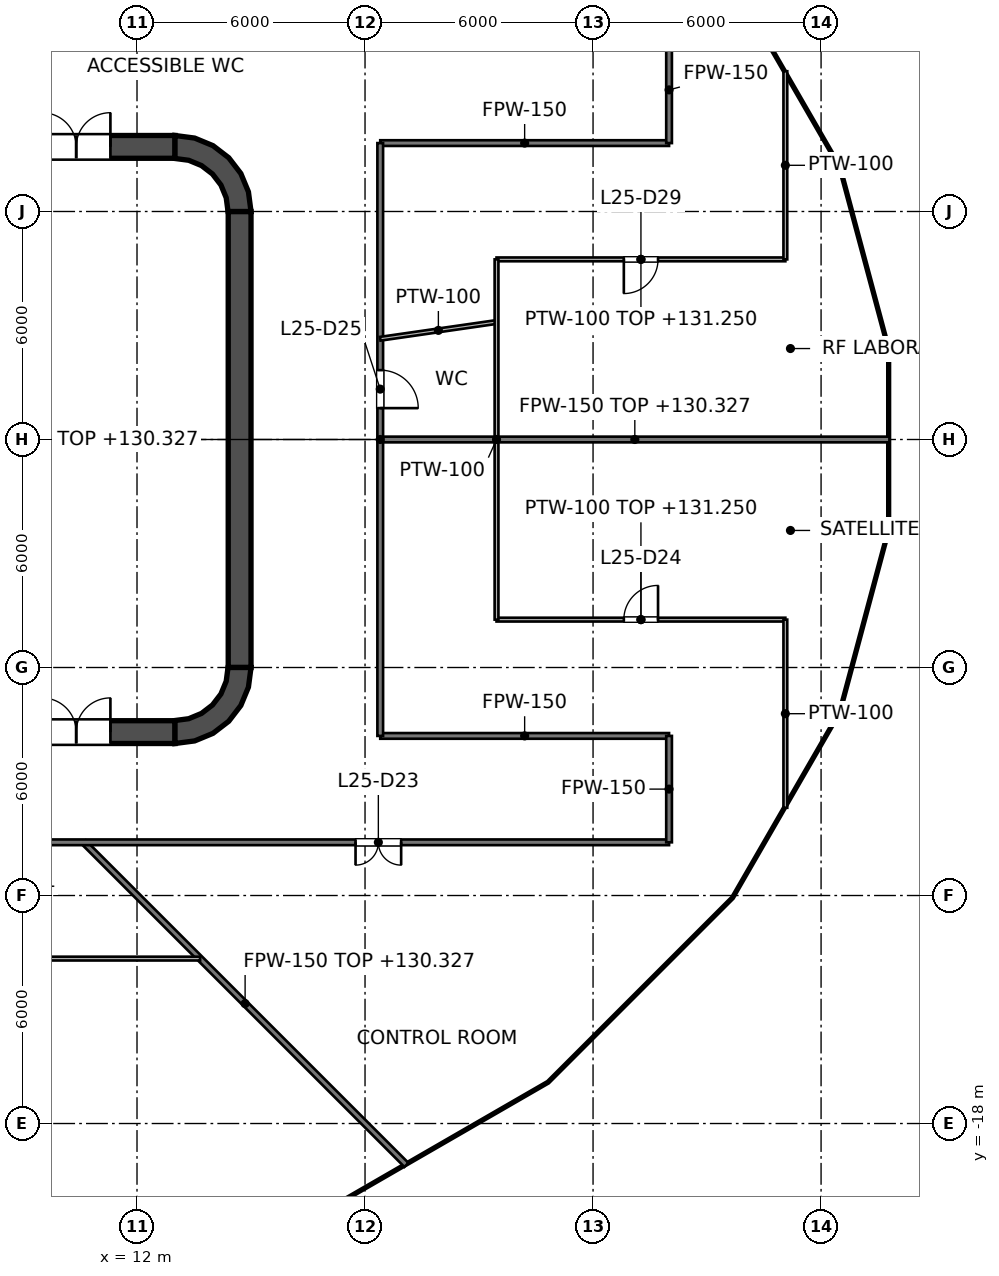
"""IFC4 building model, lengths in metres.
Left out: names, types, materials, properties, quantities, classifications, styles, units other than length and angle.
Written with IfcOpenShell. Run it as: python <this file> out.ifc"""

import sys

from ifc_helpers import new_model, si_unit, direction, frame, frame_2d, origin, place, context, subcontext, project, spatial, polyline, rectangle, outline, extrude, element, fill, save


model = new_model("IFC4")
c1 = context("Model", 3, precision=1e-05, world=origin(), true_north=direction((0.0, 1.0)))
c2 = subcontext(c1, "Body", "Model", "MODEL_VIEW")
j1 = project(units=[si_unit("LENGTHUNIT", "METRE"), si_unit("PLANEANGLEUNIT", "RADIAN")], contexts=[c1])
p1 = place(None, origin())
s1 = spatial("IfcSite", under=j1, at=p1, CompositionType="ELEMENT")
p2 = place(p1, origin())
s2 = spatial("IfcBuilding", under=s1, at=p2, CompositionType="ELEMENT")
p3 = place(p2, frame((0.0, 0.0, 127.2)))
s3 = spatial("IfcBuildingStorey", under=s2, at=p3, CompositionType="ELEMENT", Elevation=127.2)
p4 = place(p3, frame((-13.0, 7.7, 0.0), z_axis=(0.0, 0.0, 1.0), x_axis=(1.0, 0.0, 0.0)))
e1 = element("IfcWall", 1, at=p4, inside=s3, PredefinedType="SHEAR", context=c2, shape_type="SweptSolid", body=[
    extrude(rectangle(XDim=26.0, YDim=0.6, at=frame_2d((13.0, 0.0))), origin(), (0.0, 0.0, 1.0), 4.2),
])
p5 = place(p4, frame((1.7, 0.0, 0.0)))
e2 = element("IfcOpeningElement", 2, at=p5, cuts=e1, PredefinedType="OPENING", context=c2, shape_type="SweptSolid", body=[
    extrude(rectangle(XDim=1.8, YDim=2.1, at=frame_2d((0.9, 1.05))), frame((0.0, 0.3, 0.0), z_axis=(0.0, -1.0, 0.0), x_axis=(1.0, 0.0, 0.0)), (0.0, 0.0, 1.0), 0.6),
])
p6 = place(p4, frame((22.5, 0.0, 0.0)))
e3 = element("IfcOpeningElement", 3, at=p6, cuts=e1, PredefinedType="OPENING", context=c2, shape_type="SweptSolid", body=[
    extrude(rectangle(XDim=1.8, YDim=2.1, at=frame_2d((0.9, 1.05))), frame((0.0, 0.3, 0.0), z_axis=(0.0, -1.0, 0.0), x_axis=(1.0, 0.0, 0.0)), (0.0, 0.0, 1.0), 0.6),
])
p7 = place(p3, frame((-13.0, -7.7, 0.0), z_axis=(0.0, 0.0, 1.0), x_axis=(1.0, 0.0, 0.0)))
e4 = element("IfcWall", 4, at=p7, inside=s3, PredefinedType="SHEAR", context=c2, shape_type="SweptSolid", body=[
    extrude(rectangle(XDim=26.0, YDim=0.6, at=frame_2d((13.0, 0.0))), origin(), (0.0, 0.0, 1.0), 4.2),
])
p8 = place(p7, frame((1.7, 0.0, 0.0)))
e5 = element("IfcOpeningElement", 5, at=p8, cuts=e4, PredefinedType="OPENING", context=c2, shape_type="SweptSolid", body=[
    extrude(rectangle(XDim=1.8, YDim=2.1, at=frame_2d((0.9, 1.05))), frame((0.0, 0.3, 0.0), z_axis=(0.0, -1.0, 0.0), x_axis=(1.0, 0.0, 0.0)), (0.0, 0.0, 1.0), 0.6),
])
p9 = place(p7, frame((22.5, 0.0, 0.0)))
e6 = element("IfcOpeningElement", 6, at=p9, cuts=e4, PredefinedType="OPENING", context=c2, shape_type="SweptSolid", body=[
    extrude(rectangle(XDim=1.8, YDim=2.1, at=frame_2d((0.9, 1.05))), frame((0.0, 0.3, 0.0), z_axis=(0.0, -1.0, 0.0), x_axis=(1.0, 0.0, 0.0)), (0.0, 0.0, 1.0), 0.6),
])
p10 = place(p3, frame((14.7, -6.0, 0.0), z_axis=(0.0, 0.0, 1.0), x_axis=(0.0, 1.0, 0.0)))
e7 = element("IfcWall", 7, at=p10, inside=s3, PredefinedType="SHEAR", context=c2, shape_type="SweptSolid", body=[
    extrude(rectangle(XDim=12.0, YDim=0.6, at=frame_2d((6.0, 0.0))), origin(), (0.0, 0.0, 1.0), 4.2),
])
p11 = place(p3, origin())
e8 = element("IfcWall", 8, at=p11, inside=s3, PredefinedType="SHEAR", context=c2, shape_type="SweptSolid", body=[
    extrude(outline(polyline([(13.0, 8.0), (13.0, 7.395), (13.361, 7.347), (13.698, 7.208), (13.986, 6.986), (14.208, 6.698), (14.347, 6.361), (14.395, 6.0), (15.0, 6.0), (14.932, 6.518), (14.732, 7.0), (14.414, 7.414), (14.0, 7.732), (13.518, 7.932), (13.0, 8.0)])), origin(), (0.0, 0.0, 1.0), 4.2),
])
e9 = element("IfcWall", 9, at=p11, inside=s3, PredefinedType="SHEAR", context=c2, shape_type="SweptSolid", body=[
    extrude(outline(polyline([(15.0, -6.0), (14.395, -6.0), (14.347, -6.361), (14.208, -6.698), (13.986, -6.986), (13.698, -7.208), (13.361, -7.347), (13.0, -7.395), (13.0, -8.0), (13.518, -7.932), (14.0, -7.732), (14.414, -7.414), (14.732, -7.0), (14.932, -6.518), (15.0, -6.0)])), origin(), (0.0, 0.0, 1.0), 4.2),
])
p12 = place(p3, frame((11.8, -7.4, 0.0), z_axis=(0.0, 0.0, 1.0), x_axis=(0.0, 1.0, 0.0)))
e10 = element("IfcWall", 10, at=p12, inside=s3, PredefinedType="SOLIDWALL", context=c2, shape_type="SweptSolid", body=[
    extrude(rectangle(XDim=14.8, YDim=0.4, at=frame_2d((7.4, 0.0))), origin(), (0.0, 0.0, 1.0), 4.05),
])
p13 = place(p12, frame((11.2, 0.0, 0.0)))
e11 = element("IfcOpeningElement", 11, at=p13, cuts=e10, PredefinedType="OPENING", context=c2, shape_type="SweptSolid", body=[
    extrude(rectangle(XDim=1.1, YDim=2.1, at=frame_2d((0.55, 1.05))), frame((0.0, 0.2, 0.0), z_axis=(0.0, -1.0, 0.0), x_axis=(1.0, 0.0, 0.0)), (0.0, 0.0, 1.0), 0.4),
])
p14 = place(p12, frame((8.3, 0.0, 0.0)))
e12 = element("IfcOpeningElement", 12, at=p14, cuts=e10, PredefinedType="OPENING", context=c2, shape_type="SweptSolid", body=[
    extrude(rectangle(XDim=1.1, YDim=2.1, at=frame_2d((0.55, 1.05))), frame((0.0, 0.2, 0.0), z_axis=(0.0, -1.0, 0.0), x_axis=(1.0, 0.0, 0.0)), (0.0, 0.0, 1.0), 0.4),
])
p15 = place(p12, frame((5.4, 0.0, 0.0)))
e13 = element("IfcOpeningElement", 13, at=p15, cuts=e10, PredefinedType="OPENING", context=c2, shape_type="SweptSolid", body=[
    extrude(rectangle(XDim=1.1, YDim=2.1, at=frame_2d((0.55, 1.05))), frame((0.0, 0.2, 0.0), z_axis=(0.0, -1.0, 0.0), x_axis=(1.0, 0.0, 0.0)), (0.0, 0.0, 1.0), 0.4),
])
p16 = place(p12, frame((13.552, 0.0, 0.0)))
e14 = element("IfcOpeningElement", 14, at=p16, cuts=e10, PredefinedType="OPENING", context=c2, shape_type="SweptSolid", body=[
    extrude(rectangle(XDim=0.9, YDim=2.1, at=frame_2d((0.45, 1.05))), frame((0.0, 0.2, 0.0), z_axis=(0.0, -1.0, 0.0), x_axis=(1.0, 0.0, 0.0)), (0.0, 0.0, 1.0), 0.4),
])
p17 = place(p12, frame((0.347, 0.0, 0.0)))
e15 = element("IfcOpeningElement", 15, at=p17, cuts=e10, PredefinedType="OPENING", context=c2, shape_type="SweptSolid", body=[
    extrude(rectangle(XDim=0.9, YDim=2.1, at=frame_2d((0.45, 1.05))), frame((0.0, 0.2, 0.0), z_axis=(0.0, -1.0, 0.0), x_axis=(1.0, 0.0, 0.0)), (0.0, 0.0, 1.0), 0.4),
])
e16 = element("IfcWall", 16, at=p11, inside=s3, PredefinedType="SOLIDWALL", context=c2, shape_type="SweptSolid", body=[
    extrude(outline(polyline([(12.0, -5.675), (12.0, -5.925), (14.15, -5.925), (14.4, -5.925), (14.4, -5.675), (14.4, -3.025), (14.4, -2.775), (14.4, -0.125), (14.4, 0.125), (14.4, 2.775), (14.4, 3.025), (14.4, 5.675), (14.4, 5.925), (14.15, 5.925), (12.0, 5.925), (12.0, 5.675), (14.15, 5.675), (14.15, 3.025), (12.0, 3.025), (12.0, 2.775), (14.15, 2.775), (14.15, 0.125), (12.0, 0.125), (12.0, -0.125), (14.15, -0.125), (14.15, -2.775), (12.0, -2.775), (12.0, -3.025), (14.15, -3.025), (14.15, -5.675), (12.0, -5.675)])), origin(), (0.0, 0.0, 1.0), 4.05),
])
p18 = place(p3, frame((10.6, -10.6, 0.0), z_axis=(0.0, 0.0, 1.0), x_axis=(0.707106781187, -0.707106781187, 0.0)))
e17 = element("IfcWall", 17, at=p18, inside=s3, PredefinedType="PARTITIONING", context=c2, shape_type="SweptSolid", body=[
    extrude(rectangle(XDim=12.005, YDim=0.15, at=frame_2d((6.003, 0.0))), origin(), (0.0, 0.0, 1.0), 3.127),
])
p19 = place(p3, frame((-26.0, -10.6, 0.0), z_axis=(0.0, 0.0, 1.0), x_axis=(1.0, 0.0, 0.0)))
e18 = element("IfcWall", 18, at=p19, inside=s3, PredefinedType="PARTITIONING", context=c2, shape_type="SweptSolid", body=[
    extrude(rectangle(XDim=52.0, YDim=0.15, at=frame_2d((26.0, 0.0))), origin(), (0.0, 0.0, 1.0), 3.127),
])
p20 = place(p19, frame((22.49, 0.0, 0.0)))
e19 = element("IfcOpeningElement", 19, at=p20, cuts=e18, PredefinedType="OPENING", context=c2, shape_type="SweptSolid", body=[
    extrude(rectangle(XDim=1.0, YDim=2.1, at=frame_2d((0.5, 1.05))), frame((0.0, 0.075, 0.0), z_axis=(0.0, -1.0, 0.0), x_axis=(1.0, 0.0, 0.0)), (0.0, 0.0, 1.0), 0.15),
])
p21 = place(p19, frame((30.8, 0.0, 0.0)))
e20 = element("IfcOpeningElement", 20, at=p21, cuts=e18, PredefinedType="OPENING", context=c2, shape_type="SweptSolid", body=[
    extrude(rectangle(XDim=1.0, YDim=2.1, at=frame_2d((0.5, 1.05))), frame((0.0, 0.075, 0.0), z_axis=(0.0, -1.0, 0.0), x_axis=(1.0, 0.0, 0.0)), (0.0, 0.0, 1.0), 0.15),
])
p22 = place(p19, frame((43.75, 0.0, 0.0)))
e21 = element("IfcOpeningElement", 21, at=p22, cuts=e18, PredefinedType="OPENING", context=c2, shape_type="SweptSolid", body=[
    extrude(rectangle(XDim=1.2, YDim=2.1, at=frame_2d((0.6, 1.05))), frame((0.0, 0.075, 0.0), z_axis=(0.0, -1.0, 0.0), x_axis=(1.0, 0.0, 0.0)), (0.0, 0.0, 1.0), 0.15),
])
p23 = place(p19, frame((9.44, 0.0, 0.0)))
e22 = element("IfcOpeningElement", 22, at=p23, cuts=e18, PredefinedType="OPENING", context=c2, shape_type="SweptSolid", body=[
    extrude(rectangle(XDim=1.0, YDim=2.1, at=frame_2d((0.5, 1.05))), frame((0.0, 0.075, 0.0), z_axis=(0.0, -1.0, 0.0), x_axis=(1.0, 0.0, 0.0)), (0.0, 0.0, 1.0), 0.15),
])
p24 = place(p3, frame((18.4, -7.8, 0.0), z_axis=(0.0, 0.0, 1.0), x_axis=(1.0, 0.0, 0.0)))
e23 = element("IfcWall", 23, at=p24, inside=s3, PredefinedType="PARTITIONING", context=c2, shape_type="SweptSolid", body=[
    extrude(rectangle(XDim=7.6, YDim=0.15, at=frame_2d((3.8, 0.0))), origin(), (0.0, 0.0, 1.0), 3.195),
])
p25 = place(p3, frame((18.4, 0.0, 0.0), z_axis=(0.0, 0.0, 1.0), x_axis=(1.0, 0.0, 0.0)))
e24 = element("IfcWall", 24, at=p25, inside=s3, PredefinedType="PARTITIONING", context=c2, shape_type="SweptSolid", body=[
    extrude(rectangle(XDim=13.398, YDim=0.15, at=frame_2d((6.699, 0.0))), origin(), (0.0, 0.0, 1.0), 3.127),
])
p26 = place(p3, frame((18.4, 7.8, 0.0), z_axis=(0.0, 0.0, 1.0), x_axis=(1.0, 0.0, 0.0)))
e25 = element("IfcWall", 25, at=p26, inside=s3, PredefinedType="PARTITIONING", context=c2, shape_type="SweptSolid", body=[
    extrude(rectangle(XDim=7.6, YDim=0.15, at=frame_2d((3.8, 0.0))), origin(), (0.0, 0.0, 1.0), 3.195),
])
for number, where, z_axis, x_axis in (
    (26, (26.0, -10.6, 0.0), (0.0, 0.0, 1.0), (0.0, 1.0, 0.0)),
    (27, (26.0, 7.8, 0.0), (0.0, 0.0, 1.0), (0.0, 1.0, 0.0)),
):
    element("IfcWall", number, at=place(p3, frame(where, z_axis=z_axis, x_axis=x_axis)), inside=s3, PredefinedType="PARTITIONING", context=c2, shape_type="SweptSolid", body=[
        extrude(rectangle(XDim=2.8, YDim=0.15, at=frame_2d((1.4, 0.0))), origin(), (0.0, 0.0, 1.0), 3.195),
    ])
p27 = place(p3, frame((18.4, -7.8, 0.0), z_axis=(0.0, 0.0, 1.0), x_axis=(0.0, 1.0, 0.0)))
e28 = element("IfcWall", 28, at=p27, inside=s3, PredefinedType="PARTITIONING", context=c2, shape_type="SweptSolid", body=[
    extrude(rectangle(XDim=15.6, YDim=0.15, at=frame_2d((7.8, 0.0))), origin(), (0.0, 0.0, 1.0), 3.127),
])
p28 = place(p27, frame((8.625, 0.0, 0.0)))
e29 = element("IfcOpeningElement", 29, at=p28, cuts=e28, PredefinedType="OPENING", context=c2, shape_type="SweptSolid", body=[
    extrude(rectangle(XDim=1.0, YDim=2.1, at=frame_2d((0.5, 1.05))), frame((0.0, 0.075, 0.0), z_axis=(0.0, -1.0, 0.0), x_axis=(1.0, 0.0, 0.0)), (0.0, 0.0, 1.0), 0.15),
])
p29 = place(p3, frame((-26.097, -13.66, 0.0), z_axis=(0.0, 0.0, 1.0), x_axis=(1.0, 0.0, 0.0)))
e30 = element("IfcWall", 30, at=p29, inside=s3, PredefinedType="PARTITIONING", context=c2, shape_type="SweptSolid", body=[
    extrude(rectangle(XDim=39.757, YDim=0.1, at=frame_2d((19.878, 0.0))), origin(), (0.0, 0.0, 1.0), 3.127),
])
p30 = place(p29, frame((32.027, 0.0, 0.0)))
e31 = element("IfcOpeningElement", 31, at=p30, cuts=e30, PredefinedType="OPENING", context=c2, shape_type="SweptSolid", body=[
    extrude(rectangle(XDim=1.8, YDim=2.1, at=frame_2d((0.9, 1.05))), frame((0.0, 0.05, 0.0), z_axis=(0.0, -1.0, 0.0), x_axis=(1.0, 0.0, 0.0)), (0.0, 0.0, 1.0), 0.1),
])
p31 = place(p29, frame((8.605, 0.0, 0.0)))
e32 = element("IfcOpeningElement", 32, at=p31, cuts=e30, PredefinedType="OPENING", context=c2, shape_type="SweptSolid", body=[
    extrude(rectangle(XDim=0.9, YDim=2.1, at=frame_2d((0.45, 1.05))), frame((0.0, 0.05, 0.0), z_axis=(0.0, -1.0, 0.0), x_axis=(1.0, 0.0, 0.0)), (0.0, 0.0, 1.0), 0.1),
])
p32 = place(p3, frame((21.46, -4.74, 0.0), z_axis=(0.0, 0.0, 1.0), x_axis=(1.0, 0.0, 0.0)))
e33 = element("IfcWall", 33, at=p32, inside=s3, PredefinedType="PARTITIONING", context=c2, shape_type="SweptSolid", body=[
    extrude(rectangle(XDim=7.6, YDim=0.1, at=frame_2d((3.8, 0.0))), origin(), (0.0, 0.0, 1.0), 4.05),
])
p33 = place(p32, frame((3.35, 0.0, 0.0)))
e34 = element("IfcOpeningElement", 34, at=p33, cuts=e33, PredefinedType="OPENING", context=c2, shape_type="SweptSolid", body=[
    extrude(rectangle(XDim=0.9, YDim=2.1, at=frame_2d((0.45, 1.05))), frame((0.0, 0.05, 0.0), z_axis=(0.0, -1.0, 0.0), x_axis=(1.0, 0.0, 0.0)), (0.0, 0.0, 1.0), 0.1),
])
p34 = place(p3, frame((21.46, 4.74, 0.0), z_axis=(0.0, 0.0, 1.0), x_axis=(1.0, 0.0, 0.0)))
e35 = element("IfcWall", 35, at=p34, inside=s3, PredefinedType="PARTITIONING", context=c2, shape_type="SweptSolid", body=[
    extrude(rectangle(XDim=7.6, YDim=0.1, at=frame_2d((3.8, 0.0))), origin(), (0.0, 0.0, 1.0), 4.05),
])
p35 = place(p34, frame((3.35, 0.0, 0.0)))
e36 = element("IfcOpeningElement", 36, at=p35, cuts=e35, PredefinedType="OPENING", context=c2, shape_type="SweptSolid", body=[
    extrude(rectangle(XDim=0.9, YDim=2.1, at=frame_2d((0.45, 1.05))), frame((0.0, 0.05, 0.0), z_axis=(0.0, -1.0, 0.0), x_axis=(1.0, 0.0, 0.0)), (0.0, 0.0, 1.0), 0.1),
])
p36 = place(p3, frame((18.4, 2.651, 0.0), z_axis=(0.0, 0.0, 1.0), x_axis=(0.989767054152, 0.142692601472, 0.0)))
e37 = element("IfcWall", 37, at=p36, inside=s3, PredefinedType="PARTITIONING", context=c2, shape_type="SweptSolid", body=[
    extrude(rectangle(XDim=3.092, YDim=0.1, at=frame_2d((1.546, 0.0))), origin(), (0.0, 0.0, 1.0), 3.127),
])
for number, where, z_axis, x_axis in (
    (38, (29.06, -9.691, 0.0), (0.0, 0.0, 1.0), (0.0, 1.0, 0.0)),
    (39, (29.06, 4.74, 0.0), (0.0, 0.0, 1.0), (0.0, 1.0, 0.0)),
):
    element("IfcWall", number, at=place(p3, frame(where, z_axis=z_axis, x_axis=x_axis)), inside=s3, PredefinedType="PARTITIONING", context=c2, shape_type="SweptSolid", body=[
        extrude(rectangle(XDim=4.951, YDim=0.1, at=frame_2d((2.476, 0.0))), origin(), (0.0, 0.0, 1.0), 3.127),
    ])
p37 = place(p3, frame((21.46, -4.74, 0.0), z_axis=(0.0, 0.0, 1.0), x_axis=(0.0, 1.0, 0.0)))
e40 = element("IfcWall", 40, at=p37, inside=s3, PredefinedType="PARTITIONING", context=c2, shape_type="SweptSolid", body=[
    extrude(rectangle(XDim=9.48, YDim=0.1, at=frame_2d((4.74, 0.0))), origin(), (0.0, 0.0, 1.0), 3.127),
])
p38 = place(p13, origin())
e41 = element("IfcDoor", 41, at=p38, inside=s3, OperationType="DOUBLE_DOOR_SLIDING", PredefinedType="DOOR", context=c2, shape_type="SweptSolid", body=[
    extrude(rectangle(XDim=1.1, YDim=2.1, at=frame_2d((0.55, 1.05))), frame((0.0, 0.025, 0.0), z_axis=(0.0, -1.0, 0.0), x_axis=(1.0, 0.0, 0.0)), (0.0, 0.0, 1.0), 0.05),
])
fill(e11, e41)
p39 = place(p14, origin())
e42 = element("IfcDoor", 42, at=p39, inside=s3, OperationType="DOUBLE_DOOR_SLIDING", PredefinedType="DOOR", context=c2, shape_type="SweptSolid", body=[
    extrude(rectangle(XDim=1.1, YDim=2.1, at=frame_2d((0.55, 1.05))), frame((0.0, 0.025, 0.0), z_axis=(0.0, -1.0, 0.0), x_axis=(1.0, 0.0, 0.0)), (0.0, 0.0, 1.0), 0.05),
])
fill(e12, e42)
p40 = place(p15, origin())
e43 = element("IfcDoor", 43, at=p40, inside=s3, OperationType="DOUBLE_DOOR_SLIDING", PredefinedType="DOOR", context=c2, shape_type="SweptSolid", body=[
    extrude(rectangle(XDim=1.1, YDim=2.1, at=frame_2d((0.55, 1.05))), frame((0.0, 0.025, 0.0), z_axis=(0.0, -1.0, 0.0), x_axis=(1.0, 0.0, 0.0)), (0.0, 0.0, 1.0), 0.05),
])
fill(e13, e43)
p41 = place(p16, origin())
e44 = element("IfcDoor", 44, at=p41, inside=s3, OperationType="SINGLE_SWING_RIGHT", PredefinedType="DOOR", context=c2, shape_type="SweptSolid", body=[
    extrude(rectangle(XDim=0.9, YDim=2.1, at=frame_2d((0.45, 1.05))), frame((0.0, 0.025, 0.0), z_axis=(0.0, -1.0, 0.0), x_axis=(1.0, 0.0, 0.0)), (0.0, 0.0, 1.0), 0.05),
])
fill(e14, e44)
p42 = place(p17, origin())
e45 = element("IfcDoor", 45, at=p42, inside=s3, OperationType="SINGLE_SWING_RIGHT", PredefinedType="DOOR", context=c2, shape_type="SweptSolid", body=[
    extrude(rectangle(XDim=0.9, YDim=2.1, at=frame_2d((0.45, 1.05))), frame((0.0, 0.025, 0.0), z_axis=(0.0, -1.0, 0.0), x_axis=(1.0, 0.0, 0.0)), (0.0, 0.0, 1.0), 0.05),
])
fill(e15, e45)
p43 = place(p6, origin())
e46 = element("IfcDoor", 46, at=p43, inside=s3, OperationType="DOUBLE_DOOR_SINGLE_SWING", PredefinedType="DOOR", context=c2, shape_type="SweptSolid", body=[
    extrude(rectangle(XDim=1.8, YDim=2.1, at=frame_2d((0.9, 1.05))), frame((0.0, 0.025, 0.0), z_axis=(0.0, -1.0, 0.0), x_axis=(1.0, 0.0, 0.0)), (0.0, 0.0, 1.0), 0.05),
])
fill(e3, e46)
p44 = place(p9, origin())
e47 = element("IfcDoor", 47, at=p44, inside=s3, OperationType="DOUBLE_DOOR_SINGLE_SWING", PredefinedType="DOOR", context=c2, shape_type="SweptSolid", body=[
    extrude(rectangle(XDim=1.8, YDim=2.1, at=frame_2d((0.9, 1.05))), frame((0.0, 0.025, 0.0), z_axis=(0.0, -1.0, 0.0), x_axis=(1.0, 0.0, 0.0)), (0.0, 0.0, 1.0), 0.05),
])
fill(e6, e47)
p45 = place(p22, origin())
e48 = element("IfcDoor", 48, at=p45, inside=s3, OperationType="DOUBLE_DOOR_SINGLE_SWING", PredefinedType="DOOR", context=c2, shape_type="SweptSolid", body=[
    extrude(rectangle(XDim=1.2, YDim=2.1, at=frame_2d((0.6, 1.05))), frame((0.0, 0.025, 0.0), z_axis=(0.0, -1.0, 0.0), x_axis=(1.0, 0.0, 0.0)), (0.0, 0.0, 1.0), 0.05),
])
fill(e21, e48)
p46 = place(p33, origin())
e49 = element("IfcDoor", 49, at=p46, inside=s3, OperationType="SINGLE_SWING_RIGHT", PredefinedType="DOOR", context=c2, shape_type="SweptSolid", body=[
    extrude(rectangle(XDim=0.9, YDim=2.1, at=frame_2d((0.45, 1.05))), frame((0.0, 0.025, 0.0), z_axis=(0.0, -1.0, 0.0), x_axis=(1.0, 0.0, 0.0)), (0.0, 0.0, 1.0), 0.05),
])
fill(e34, e49)
p47 = place(p28, origin())
e50 = element("IfcDoor", 50, at=p47, inside=s3, OperationType="SINGLE_SWING_LEFT", PredefinedType="DOOR", context=c2, shape_type="SweptSolid", body=[
    extrude(rectangle(XDim=1.0, YDim=2.1, at=frame_2d((0.5, 1.05))), frame((0.0, 0.025, 0.0), z_axis=(0.0, -1.0, 0.0), x_axis=(1.0, 0.0, 0.0)), (0.0, 0.0, 1.0), 0.05),
])
fill(e29, e50)
p48 = place(p35, origin())
e51 = element("IfcDoor", 51, at=p48, inside=s3, OperationType="SINGLE_SWING_LEFT", PredefinedType="DOOR", context=c2, shape_type="SweptSolid", body=[
    extrude(rectangle(XDim=0.9, YDim=2.1, at=frame_2d((0.45, 1.05))), frame((0.0, 0.025, 0.0), z_axis=(0.0, -1.0, 0.0), x_axis=(1.0, 0.0, 0.0)), (0.0, 0.0, 1.0), 0.05),
])
fill(e36, e51)
save(model, sys.argv[1])
